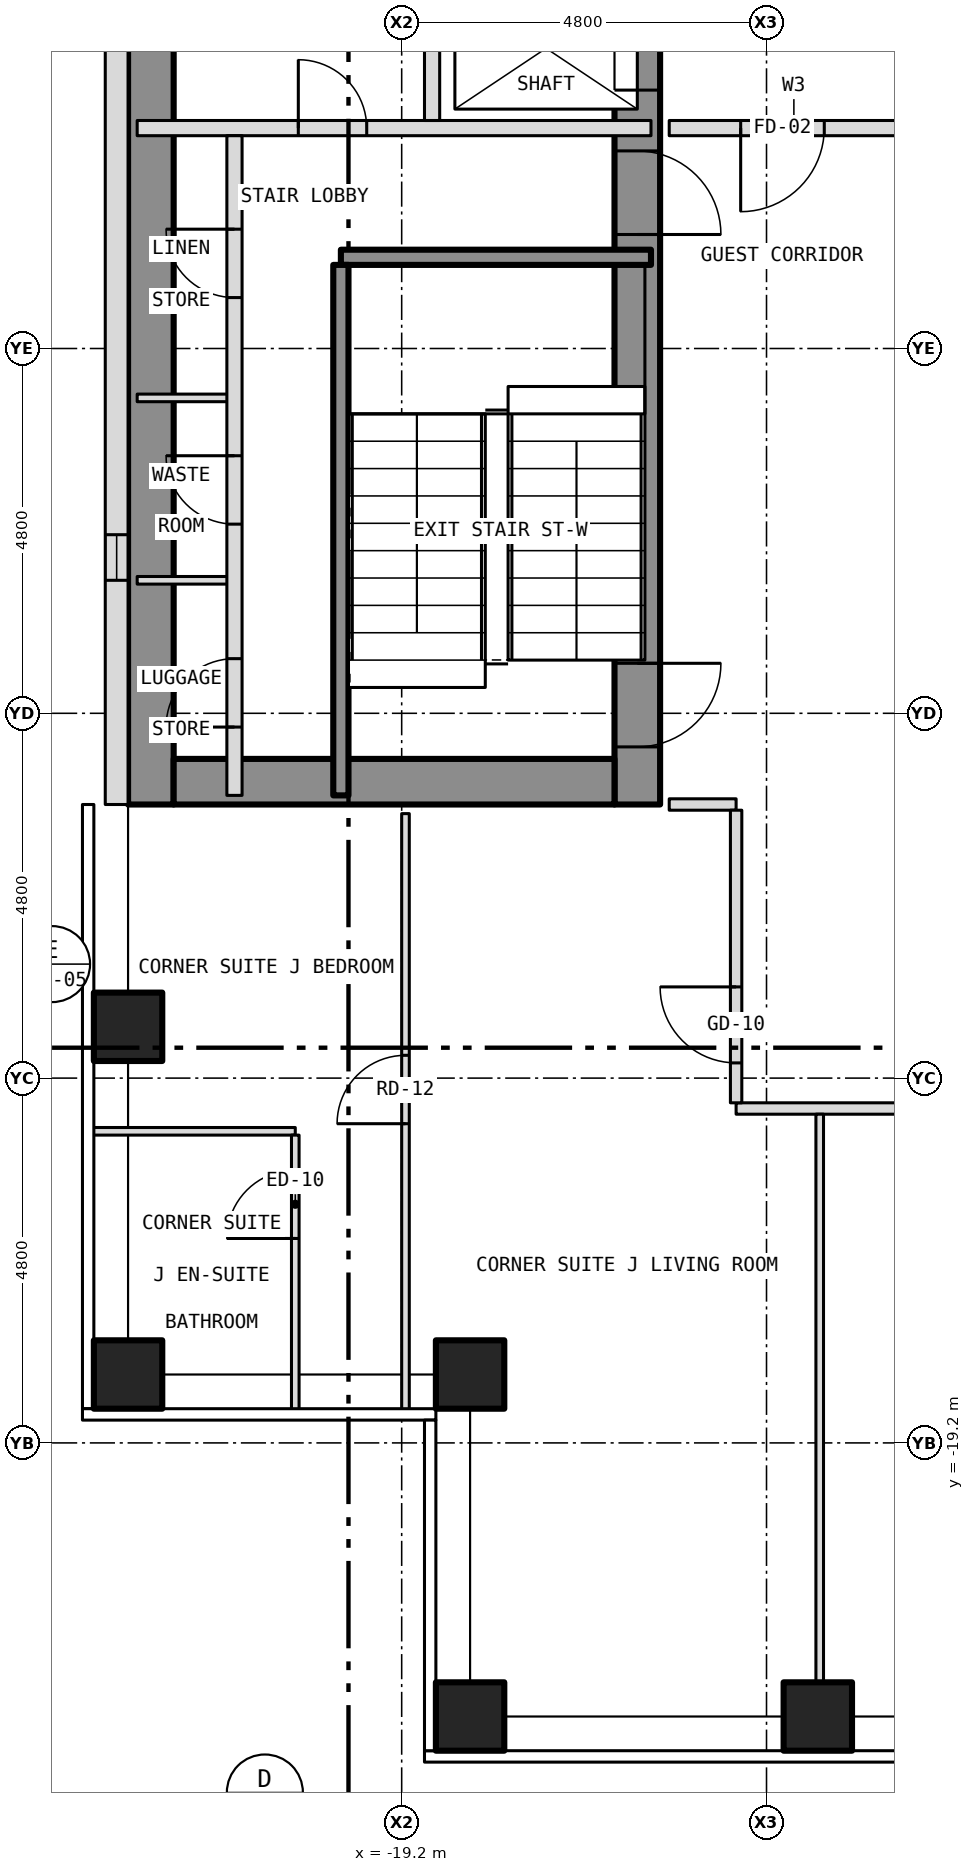
"""IFC4 building model, lengths in metres.
Left out: names, types, materials, properties, quantities, classifications, styles, units other than length and angle.
Written with IfcOpenShell. Run it as: python <this file> out.ifc"""

import sys

from ifc_helpers import new_model, si_unit, direction, frame, frame_2d, origin, origin_2d, place, context, subcontext, project, spatial, rectangle, hollow_rectangle, extrude, element, fill, save


model = new_model("IFC4")
c1 = context("Model", 3, precision=1e-05, world=origin(), true_north=direction((0.0, 1.0)))
c2 = subcontext(c1, "Body", "Model", "MODEL_VIEW")
j1 = project(units=[si_unit("LENGTHUNIT", "METRE"), si_unit("PLANEANGLEUNIT", "RADIAN")], contexts=[c1])
p1 = place(None, origin())
s1 = spatial("IfcSite", under=j1, at=p1, CompositionType="ELEMENT")
p2 = place(p1, origin())
s2 = spatial("IfcBuilding", under=s1, at=p2, CompositionType="ELEMENT")
p3 = place(p2, frame((0.0, 0.0, 92.5)))
s3 = spatial("IfcBuildingStorey", under=s2, at=p3, CompositionType="ELEMENT", Elevation=92.5)
for number, where, z_axis, x_axis in (
    (1, (-18.3, -22.8, -0.15), (0.0, 0.0, 1.0), (1.0, 0.0, 0.0)),
    (2, (-13.725, -22.8, -0.15), (0.0, 0.0, 1.0), (1.0, 0.0, 0.0)),
    (3, (-22.8, -18.3, -0.15), (0.0, 0.0, 1.0), (1.0, 0.0, 0.0)),
    (4, (-22.8, -13.725, -0.15), (0.0, 0.0, 1.0), (1.0, 0.0, 0.0)),
    (5, (-18.3, -18.3, -0.15), (0.0, 0.0, 1.0), (1.0, 0.0, 0.0)),
):
    element("IfcColumn", number, at=place(p3, frame(where, z_axis=z_axis, x_axis=x_axis)), inside=s3, PredefinedType="COLUMN", context=c2, shape_type="SweptSolid", body=[
        extrude(hollow_rectangle(XDim=0.9, YDim=0.9, WallThickness=0.05, at=origin_2d()), origin(), (0.0, 0.0, 1.0), 3.5),
    ])
p4 = place(p3, frame((-16.1, -10.8, 0.0), z_axis=(0.0, 0.0, 1.0), x_axis=(0.0, 1.0, 0.0)))
e6 = element("IfcWall", 6, at=p4, inside=s3, PredefinedType="SHEAR", context=c2, shape_type="SweptSolid", body=[
    extrude(rectangle(XDim=21.6, YDim=0.6, at=frame_2d((10.8, 0.0))), origin(), (0.0, 0.0, 1.0), 3.25),
])
p5 = place(p4, frame((9.4, 0.0, 0.0)))
e7 = element("IfcOpeningElement", 7, at=p5, cuts=e6, PredefinedType="OPENING", context=c2, shape_type="SweptSolid", body=[
    extrude(rectangle(XDim=1.1, YDim=2.1, at=frame_2d((0.55, 1.05))), frame((0.0, 0.312, 0.0), z_axis=(0.0, -1.0, 0.0), x_axis=(1.0, 0.0, 0.0)), (0.0, 0.0, 1.0), 0.624),
])
p6 = place(p4, frame((11.5, 0.0, 0.0)))
e8 = element("IfcOpeningElement", 8, at=p6, cuts=e6, PredefinedType="OPENING", context=c2, shape_type="SweptSolid", body=[
    extrude(rectangle(XDim=1.1, YDim=2.1, at=frame_2d((0.55, 1.05))), frame((0.0, 0.312, 0.0), z_axis=(0.0, -1.0, 0.0), x_axis=(1.0, 0.0, 0.0)), (0.0, 0.0, 1.0), 0.624),
])
p7 = place(p4, frame((13.6, 0.0, 0.0)))
e9 = element("IfcOpeningElement", 9, at=p7, cuts=e6, PredefinedType="OPENING", context=c2, shape_type="SweptSolid", body=[
    extrude(rectangle(XDim=1.1, YDim=2.1, at=frame_2d((0.55, 1.05))), frame((0.0, 0.312, 0.0), z_axis=(0.0, -1.0, 0.0), x_axis=(1.0, 0.0, 0.0)), (0.0, 0.0, 1.0), 0.624),
])
p8 = place(p4, frame((15.7, 0.0, 0.0)))
e10 = element("IfcOpeningElement", 10, at=p8, cuts=e6, PredefinedType="OPENING", context=c2, shape_type="SweptSolid", body=[
    extrude(rectangle(XDim=1.1, YDim=2.1, at=frame_2d((0.55, 1.05))), frame((0.0, 0.312, 0.0), z_axis=(0.0, -1.0, 0.0), x_axis=(1.0, 0.0, 0.0)), (0.0, 0.0, 1.0), 0.624),
])
p9 = place(p4, frame((17.8, 0.0, 0.0)))
e11 = element("IfcOpeningElement", 11, at=p9, cuts=e6, PredefinedType="OPENING", context=c2, shape_type="SweptSolid", body=[
    extrude(rectangle(XDim=1.1, YDim=2.1, at=frame_2d((0.55, 1.05))), frame((0.0, 0.312, 0.0), z_axis=(0.0, -1.0, 0.0), x_axis=(1.0, 0.0, 0.0)), (0.0, 0.0, 1.0), 0.624),
])
p10 = place(p4, frame((0.758, 0.0, 0.0)))
e12 = element("IfcOpeningElement", 12, at=p10, cuts=e6, PredefinedType="OPENING", context=c2, shape_type="SweptSolid", body=[
    extrude(rectangle(XDim=1.1, YDim=2.1, at=frame_2d((0.55, 1.05))), frame((0.0, 0.312, 0.0), z_axis=(0.0, -1.0, 0.0), x_axis=(1.0, 0.0, 0.0)), (0.0, 0.0, 1.0), 0.624),
])
p11 = place(p4, frame((7.5, 0.0, 0.0)))
e13 = element("IfcOpeningElement", 13, at=p11, cuts=e6, PredefinedType="OPENING", context=c2, shape_type="SweptSolid", body=[
    extrude(rectangle(XDim=1.1, YDim=2.1, at=frame_2d((0.55, 1.05))), frame((0.0, 0.312, 0.0), z_axis=(0.0, -1.0, 0.0), x_axis=(1.0, 0.0, 0.0)), (0.0, 0.0, 1.0), 0.624),
])
p12 = place(p3, frame((-22.5, -10.8, 0.0), z_axis=(0.0, 0.0, 1.0), x_axis=(0.0, 1.0, 0.0)))
e14 = element("IfcWall", 14, at=p12, inside=s3, PredefinedType="SHEAR", context=c2, shape_type="SweptSolid", body=[
    extrude(rectangle(XDim=21.6, YDim=0.6, at=frame_2d((10.8, 0.0))), origin(), (0.0, 0.0, 1.0), 3.25),
])
p13 = place(p3, frame((-22.2, -10.5, 0.0), z_axis=(0.0, 0.0, 1.0), x_axis=(1.0, 0.0, 0.0)))
e15 = element("IfcWall", 15, at=p13, inside=s3, PredefinedType="SHEAR", context=c2, shape_type="SweptSolid", body=[
    extrude(rectangle(XDim=5.8, YDim=0.6, at=frame_2d((2.9, 0.0))), origin(), (0.0, 0.0, 1.0), 3.25),
])
p14 = place(p3, frame((-22.95, 10.8, 0.0), z_axis=(0.0, 0.0, 1.0), x_axis=(0.0, -1.0, 0.0)))
e16 = element("IfcWall", 16, at=p14, inside=s3, PredefinedType="SOLIDWALL", context=c2, shape_type="SweptSolid", body=[
    extrude(rectangle(XDim=21.6, YDim=0.3, at=frame_2d((10.8, 0.0))), origin(), (0.0, 0.0, 1.0), 3.5),
])
p15 = place(p14, frame((18.05, 0.0, 1.0)))
e17 = element("IfcOpeningElement", 17, at=p15, cuts=e16, PredefinedType="OPENING", context=c2, shape_type="SweptSolid", body=[
    extrude(rectangle(XDim=0.6, YDim=1.5, at=frame_2d((0.3, 0.75))), frame((0.0, 0.162, 0.0), z_axis=(0.0, -1.0, 0.0), x_axis=(1.0, 0.0, 0.0)), (0.0, 0.0, 1.0), 0.324),
])
p16 = place(p3, frame((-23.28, -15.1, 0.0), z_axis=(0.0, 0.0, 1.0), x_axis=(1.0, 0.0, 0.0)))
e18 = element("IfcWall", 18, at=p16, inside=s3, PredefinedType="PARTITIONING", context=c2, shape_type="SweptSolid", body=[
    extrude(rectangle(XDim=2.68, YDim=0.1, at=frame_2d((1.34, 0.0))), origin(), (0.0, 0.0, 1.0), 3.35),
])
p17 = place(p3, frame((-14.8, -14.8, 0.0), z_axis=(0.0, 0.0, 1.0), x_axis=(1.0, 0.0, 0.0)))
e19 = element("IfcWall", 19, at=p17, inside=s3, PredefinedType="PARTITIONING", context=c2, shape_type="SweptSolid", body=[
    extrude(rectangle(XDim=29.6, YDim=0.15, at=frame_2d((14.8, 0.0))), origin(), (0.0, 0.0, 1.0), 3.35),
])
p18 = place(p17, frame((2.907, 0.0, 0.0)))
e20 = element("IfcOpeningElement", 20, at=p18, cuts=e19, PredefinedType="OPENING", context=c2, shape_type="SweptSolid", body=[
    extrude(rectangle(XDim=1.0, YDim=2.1, at=frame_2d((0.5, 1.05))), frame((0.0, 0.087, 0.0), z_axis=(0.0, -1.0, 0.0), x_axis=(1.0, 0.0, 0.0)), (0.0, 0.0, 1.0), 0.174),
])
p19 = place(p17, frame((10.826, 0.0, 0.0)))
e21 = element("IfcOpeningElement", 21, at=p19, cuts=e19, PredefinedType="OPENING", context=c2, shape_type="SweptSolid", body=[
    extrude(rectangle(XDim=1.0, YDim=2.1, at=frame_2d((0.5, 1.05))), frame((0.0, 0.087, 0.0), z_axis=(0.0, -1.0, 0.0), x_axis=(1.0, 0.0, 0.0)), (0.0, 0.0, 1.0), 0.174),
])
p20 = place(p17, frame((15.401, 0.0, 0.0)))
e22 = element("IfcOpeningElement", 22, at=p20, cuts=e19, PredefinedType="OPENING", context=c2, shape_type="SweptSolid", body=[
    extrude(rectangle(XDim=1.0, YDim=2.1, at=frame_2d((0.5, 1.05))), frame((0.0, 0.087, 0.0), z_axis=(0.0, -1.0, 0.0), x_axis=(1.0, 0.0, 0.0)), (0.0, 0.0, 1.0), 0.174),
])
p21 = place(p17, frame((18.919, 0.0, 0.0)))
e23 = element("IfcOpeningElement", 23, at=p21, cuts=e19, PredefinedType="OPENING", context=c2, shape_type="SweptSolid", body=[
    extrude(rectangle(XDim=1.0, YDim=2.1, at=frame_2d((0.5, 1.05))), frame((0.0, 0.087, 0.0), z_axis=(0.0, -1.0, 0.0), x_axis=(1.0, 0.0, 0.0)), (0.0, 0.0, 1.0), 0.174),
])
p22 = place(p17, frame((24.638, 0.0, 0.0)))
e24 = element("IfcOpeningElement", 24, at=p22, cuts=e19, PredefinedType="OPENING", context=c2, shape_type="SweptSolid", body=[
    extrude(rectangle(XDim=1.0, YDim=2.1, at=frame_2d((0.5, 1.05))), frame((0.0, 0.087, 0.0), z_axis=(0.0, -1.0, 0.0), x_axis=(1.0, 0.0, 0.0)), (0.0, 0.0, 1.0), 0.174),
])
p23 = place(p3, frame((-15.68, -10.8, 0.0), z_axis=(0.0, 0.0, 1.0), x_axis=(1.0, 0.0, 0.0)))
e25 = element("IfcWall", 25, at=p23, inside=s3, PredefinedType="PARTITIONING", context=c2, shape_type="SweptSolid", body=[
    extrude(rectangle(XDim=0.88, YDim=0.15, at=frame_2d((0.44, 0.0))), origin(), (0.0, 0.0, 1.0), 3.35),
])
for number, where, z_axis, x_axis in (
    (26, (-22.68, -7.85, 0.0), (0.0, 0.0, 1.0), (1.0, 0.0, 0.0)),
    (27, (-22.68, -5.45, 0.0), (0.0, 0.0, 1.0), (1.0, 0.0, 0.0)),
):
    element("IfcWall", number, at=place(p3, frame(where, z_axis=z_axis, x_axis=x_axis)), inside=s3, PredefinedType="PARTITIONING", context=c2, shape_type="SweptSolid", body=[
        extrude(rectangle(XDim=1.28, YDim=0.1, at=frame_2d((0.64, 0.0))), origin(), (0.0, 0.0, 1.0), 3.25),
    ])
p24 = place(p3, frame((-20.0, -3.6, 0.0), z_axis=(0.0, 0.0, 1.0), x_axis=(1.0, 0.0, 0.0)))
e28 = element("IfcWall", 28, at=p24, inside=s3, PredefinedType="SHEAR", context=c2, shape_type="SweptSolid", body=[
    extrude(rectangle(XDim=4.08, YDim=0.2, at=frame_2d((2.04, 0.0))), origin(), (0.0, 0.0, 1.0), 3.25),
])
p25 = place(p3, frame((-22.68, -1.9, 0.0), z_axis=(0.0, 0.0, 1.0), x_axis=(1.0, 0.0, 0.0)))
e29 = element("IfcWall", 29, at=p25, inside=s3, PredefinedType="PARTITIONING", context=c2, shape_type="SweptSolid", body=[
    extrude(rectangle(XDim=6.76, YDim=0.2, at=frame_2d((3.38, 0.0))), origin(), (0.0, 0.0, 1.0), 3.25),
])
p26 = place(p25, frame((2.12, 0.0, 0.0)))
e30 = element("IfcOpeningElement", 30, at=p26, cuts=e29, PredefinedType="OPENING", context=c2, shape_type="SweptSolid", body=[
    extrude(rectangle(XDim=0.9, YDim=2.1, at=frame_2d((0.45, 1.05))), frame((0.0, 0.112, 0.0), z_axis=(0.0, -1.0, 0.0), x_axis=(1.0, 0.0, 0.0)), (0.0, 0.0, 1.0), 0.224),
])
p27 = place(p3, frame((-15.68, -1.9, 0.0), z_axis=(0.0, 0.0, 1.0), x_axis=(1.0, 0.0, 0.0)))
e31 = element("IfcWall", 31, at=p27, inside=s3, PredefinedType="PARTITIONING", context=c2, shape_type="SweptSolid", body=[
    extrude(rectangle(XDim=3.28, YDim=0.2, at=frame_2d((1.64, 0.0))), origin(), (0.0, 0.0, 1.0), 3.35),
])
p28 = place(p27, frame((0.94, 0.0, 0.0)))
e32 = element("IfcOpeningElement", 32, at=p28, cuts=e31, PredefinedType="OPENING", context=c2, shape_type="SweptSolid", body=[
    extrude(rectangle(XDim=1.1, YDim=2.1, at=frame_2d((0.55, 1.05))), frame((0.0, 0.112, 0.0), z_axis=(0.0, -1.0, 0.0), x_axis=(1.0, 0.0, 0.0)), (0.0, 0.0, 1.0), 0.224),
])
p29 = place(p3, frame((-21.4, -10.68, 0.0), z_axis=(0.0, 0.0, 1.0), x_axis=(0.0, 1.0, 0.0)))
e33 = element("IfcWall", 33, at=p29, inside=s3, PredefinedType="PARTITIONING", context=c2, shape_type="SweptSolid", body=[
    extrude(rectangle(XDim=8.68, YDim=0.2, at=frame_2d((4.34, 0.0))), origin(), (0.0, 0.0, 1.0), 3.25),
])
p30 = place(p29, frame((0.899, 0.0, 0.0)))
e34 = element("IfcOpeningElement", 34, at=p30, cuts=e33, PredefinedType="OPENING", context=c2, shape_type="SweptSolid", body=[
    extrude(rectangle(XDim=0.9, YDim=2.1, at=frame_2d((0.45, 1.05))), frame((0.0, 0.112, 0.0), z_axis=(0.0, -1.0, 0.0), x_axis=(1.0, 0.0, 0.0)), (0.0, 0.0, 1.0), 0.224),
])
p31 = place(p29, frame((3.569, 0.0, 0.0)))
e35 = element("IfcOpeningElement", 35, at=p31, cuts=e33, PredefinedType="OPENING", context=c2, shape_type="SweptSolid", body=[
    extrude(rectangle(XDim=0.9, YDim=2.1, at=frame_2d((0.45, 1.05))), frame((0.0, 0.112, 0.0), z_axis=(0.0, -1.0, 0.0), x_axis=(1.0, 0.0, 0.0)), (0.0, 0.0, 1.0), 0.224),
])
p32 = place(p29, frame((6.55, 0.0, 0.0)))
e36 = element("IfcOpeningElement", 36, at=p32, cuts=e33, PredefinedType="OPENING", context=c2, shape_type="SweptSolid", body=[
    extrude(rectangle(XDim=0.9, YDim=2.1, at=frame_2d((0.45, 1.05))), frame((0.0, 0.112, 0.0), z_axis=(0.0, -1.0, 0.0), x_axis=(1.0, 0.0, 0.0)), (0.0, 0.0, 1.0), 0.224),
])
p33 = place(p3, frame((-20.6, -18.78, 0.0), z_axis=(0.0, 0.0, 1.0), x_axis=(0.0, 1.0, 0.0)))
e37 = element("IfcWall", 37, at=p33, inside=s3, PredefinedType="PARTITIONING", context=c2, shape_type="SweptSolid", body=[
    extrude(rectangle(XDim=3.63, YDim=0.1, at=frame_2d((1.815, 0.0))), origin(), (0.0, 0.0, 1.0), 3.35),
])
p34 = place(p33, frame((2.27, 0.0, 0.0)))
e38 = element("IfcOpeningElement", 38, at=p34, cuts=e37, PredefinedType="OPENING", context=c2, shape_type="SweptSolid", body=[
    extrude(rectangle(XDim=0.9, YDim=2.1, at=frame_2d((0.45, 1.05))), frame((0.0, 0.062, 0.0), z_axis=(0.0, -1.0, 0.0), x_axis=(1.0, 0.0, 0.0)), (0.0, 0.0, 1.0), 0.124),
])
p35 = place(p3, frame((-20.0, -10.68, 0.0), z_axis=(0.0, 0.0, 1.0), x_axis=(0.0, 1.0, 0.0)))
e39 = element("IfcWall", 39, at=p35, inside=s3, PredefinedType="SHEAR", context=c2, shape_type="SweptSolid", body=[
    extrude(rectangle(XDim=6.98, YDim=0.2, at=frame_2d((3.49, 0.0))), origin(), (0.0, 0.0, 1.0), 3.25),
])
p36 = place(p3, frame((-19.15, -18.78, 0.0), z_axis=(0.0, 0.0, 1.0), x_axis=(0.0, 1.0, 0.0)))
e40 = element("IfcWall", 40, at=p36, inside=s3, PredefinedType="PARTITIONING", context=c2, shape_type="SweptSolid", body=[
    extrude(rectangle(XDim=7.86, YDim=0.1, at=frame_2d((3.93, 0.0))), origin(), (0.0, 0.0, 1.0), 2.817),
])
p37 = place(p36, frame((3.78, 0.0, 0.0)))
e41 = element("IfcOpeningElement", 41, at=p37, cuts=e40, PredefinedType="OPENING", context=c2, shape_type="SweptSolid", body=[
    extrude(rectangle(XDim=0.9, YDim=2.1, at=frame_2d((0.45, 1.05))), frame((0.0, 0.062, 0.0), z_axis=(0.0, -1.0, 0.0), x_axis=(1.0, 0.0, 0.0)), (0.0, 0.0, 1.0), 0.124),
])
p38 = place(p3, frame((-18.8, -1.8, 0.0), z_axis=(0.0, 0.0, 1.0), x_axis=(0.0, 1.0, 0.0)))
e42 = element("IfcWall", 42, at=p38, inside=s3, PredefinedType="PARTITIONING", context=c2, shape_type="SweptSolid", body=[
    extrude(rectangle(XDim=6.15, YDim=0.2, at=frame_2d((3.075, 0.0))), origin(), (0.0, 0.0, 1.0), 3.25),
])
p39 = place(p3, frame((-14.8, -14.725, 0.0), z_axis=(0.0, 0.0, 1.0), x_axis=(0.0, 1.0, 0.0)))
e43 = element("IfcWall", 43, at=p39, inside=s3, PredefinedType="PARTITIONING", context=c2, shape_type="SweptSolid", body=[
    extrude(rectangle(XDim=3.85, YDim=0.15, at=frame_2d((1.925, 0.0))), origin(), (0.0, 0.0, 1.0), 3.35),
])
p40 = place(p39, frame((0.525, 0.0, 0.0)))
e44 = element("IfcOpeningElement", 44, at=p40, cuts=e43, PredefinedType="OPENING", context=c2, shape_type="SweptSolid", body=[
    extrude(rectangle(XDim=1.0, YDim=2.1, at=frame_2d((0.5, 1.05))), frame((0.0, 0.087, 0.0), z_axis=(0.0, -1.0, 0.0), x_axis=(1.0, 0.0, 0.0)), (0.0, 0.0, 1.0), 0.174),
])
p41 = place(p3, frame((-13.7, -22.68, 0.0), z_axis=(0.0, 0.0, 1.0), x_axis=(0.0, 1.0, 0.0)))
e45 = element("IfcWall", 45, at=p41, inside=s3, PredefinedType="PARTITIONING", context=c2, shape_type="SweptSolid", body=[
    extrude(rectangle(XDim=7.805, YDim=0.1, at=frame_2d((3.902, 0.0))), origin(), (0.0, 0.0, 1.0), 3.35),
])
p42 = place(p15, origin())
e46 = element("IfcWindow", 46, at=p42, inside=s3, PartitioningType="SINGLE_PANEL", PredefinedType="WINDOW", context=c2, shape_type="SweptSolid", body=[
    extrude(rectangle(XDim=0.6, YDim=1.5, at=frame_2d((0.3, 0.75))), frame((0.0, -0.06, 0.0), z_axis=(0.0, -1.0, 0.0), x_axis=(1.0, 0.0, 0.0)), (0.0, 0.0, 1.0), 0.06),
])
fill(e17, e46)
p43 = place(p5, origin())
e47 = element("IfcDoor", 47, at=p43, inside=s3, OperationType="SLIDING_TO_LEFT", PredefinedType="DOOR", context=c2, shape_type="SweptSolid", body=[
    extrude(rectangle(XDim=1.1, YDim=2.1, at=frame_2d((0.55, 1.05))), frame((0.0, 0.025, 0.0), z_axis=(0.0, -1.0, 0.0), x_axis=(1.0, 0.0, 0.0)), (0.0, 0.0, 1.0), 0.05),
])
fill(e7, e47)
p44 = place(p10, origin())
e48 = element("IfcDoor", 48, at=p44, inside=s3, OperationType="SINGLE_SWING_RIGHT", PredefinedType="DOOR", context=c2, shape_type="SweptSolid", body=[
    extrude(rectangle(XDim=1.1, YDim=2.1, at=frame_2d((0.55, 1.05))), frame((0.0, 0.025, 0.0), z_axis=(0.0, -1.0, 0.0), x_axis=(1.0, 0.0, 0.0)), (0.0, 0.0, 1.0), 0.05),
])
fill(e12, e48)
p45 = place(p11, origin())
e49 = element("IfcDoor", 49, at=p45, inside=s3, OperationType="SINGLE_SWING_LEFT", PredefinedType="DOOR", context=c2, shape_type="SweptSolid", body=[
    extrude(rectangle(XDim=1.1, YDim=2.1, at=frame_2d((0.55, 1.05))), frame((0.0, 0.025, 0.0), z_axis=(0.0, -1.0, 0.0), x_axis=(1.0, 0.0, 0.0)), (0.0, 0.0, 1.0), 0.05),
])
fill(e13, e49)
p46 = place(p30, origin())
e50 = element("IfcDoor", 50, at=p46, inside=s3, OperationType="SINGLE_SWING_LEFT", PredefinedType="DOOR", context=c2, shape_type="SweptSolid", body=[
    extrude(rectangle(XDim=0.9, YDim=2.1, at=frame_2d((0.45, 1.05))), frame((0.0, 0.025, 0.0), z_axis=(0.0, -1.0, 0.0), x_axis=(1.0, 0.0, 0.0)), (0.0, 0.0, 1.0), 0.05),
])
fill(e34, e50)
p47 = place(p31, origin())
e51 = element("IfcDoor", 51, at=p47, inside=s3, OperationType="SINGLE_SWING_RIGHT", PredefinedType="DOOR", context=c2, shape_type="SweptSolid", body=[
    extrude(rectangle(XDim=0.9, YDim=2.1, at=frame_2d((0.45, 1.05))), frame((0.0, 0.025, 0.0), z_axis=(0.0, -1.0, 0.0), x_axis=(1.0, 0.0, 0.0)), (0.0, 0.0, 1.0), 0.05),
])
fill(e35, e51)
p48 = place(p32, origin())
e52 = element("IfcDoor", 52, at=p48, inside=s3, OperationType="SINGLE_SWING_RIGHT", PredefinedType="DOOR", context=c2, shape_type="SweptSolid", body=[
    extrude(rectangle(XDim=0.9, YDim=2.1, at=frame_2d((0.45, 1.05))), frame((0.0, 0.025, 0.0), z_axis=(0.0, -1.0, 0.0), x_axis=(1.0, 0.0, 0.0)), (0.0, 0.0, 1.0), 0.05),
])
fill(e36, e52)
p49 = place(p26, origin())
e53 = element("IfcDoor", 53, at=p49, inside=s3, OperationType="SINGLE_SWING_LEFT", PredefinedType="DOOR", context=c2, shape_type="SweptSolid", body=[
    extrude(rectangle(XDim=0.9, YDim=2.1, at=frame_2d((0.45, 1.05))), frame((0.0, 0.025, 0.0), z_axis=(0.0, -1.0, 0.0), x_axis=(1.0, 0.0, 0.0)), (0.0, 0.0, 1.0), 0.05),
])
fill(e30, e53)
p50 = place(p28, origin())
e54 = element("IfcDoor", 54, at=p50, inside=s3, OperationType="SINGLE_SWING_LEFT", PredefinedType="DOOR", context=c2, shape_type="SweptSolid", body=[
    extrude(rectangle(XDim=1.1, YDim=2.1, at=frame_2d((0.55, 1.05))), frame((0.0, 0.025, 0.0), z_axis=(0.0, -1.0, 0.0), x_axis=(1.0, 0.0, 0.0)), (0.0, 0.0, 1.0), 0.05),
])
fill(e32, e54)
p51 = place(p40, origin())
e55 = element("IfcDoor", 55, at=p51, inside=s3, OperationType="SINGLE_SWING_RIGHT", PredefinedType="DOOR", context=c2, shape_type="SweptSolid", body=[
    extrude(rectangle(XDim=1.0, YDim=2.1, at=frame_2d((0.5, 1.05))), frame((0.0, 0.025, 0.0), z_axis=(0.0, -1.0, 0.0), x_axis=(1.0, 0.0, 0.0)), (0.0, 0.0, 1.0), 0.05),
])
fill(e44, e55)
p52 = place(p37, origin())
e56 = element("IfcDoor", 56, at=p52, inside=s3, OperationType="SINGLE_SWING_LEFT", PredefinedType="DOOR", context=c2, shape_type="SweptSolid", body=[
    extrude(rectangle(XDim=0.9, YDim=2.1, at=frame_2d((0.45, 1.05))), frame((0.0, 0.025, 0.0), z_axis=(0.0, -1.0, 0.0), x_axis=(1.0, 0.0, 0.0)), (0.0, 0.0, 1.0), 0.05),
])
fill(e41, e56)
p53 = place(p34, origin())
e57 = element("IfcDoor", 57, at=p53, inside=s3, OperationType="SINGLE_SWING_LEFT", PredefinedType="DOOR", context=c2, shape_type="SweptSolid", body=[
    extrude(rectangle(XDim=0.9, YDim=2.1, at=frame_2d((0.45, 1.05))), frame((0.0, 0.025, 0.0), z_axis=(0.0, -1.0, 0.0), x_axis=(1.0, 0.0, 0.0)), (0.0, 0.0, 1.0), 0.05),
])
fill(e38, e57)
save(model, sys.argv[1])
